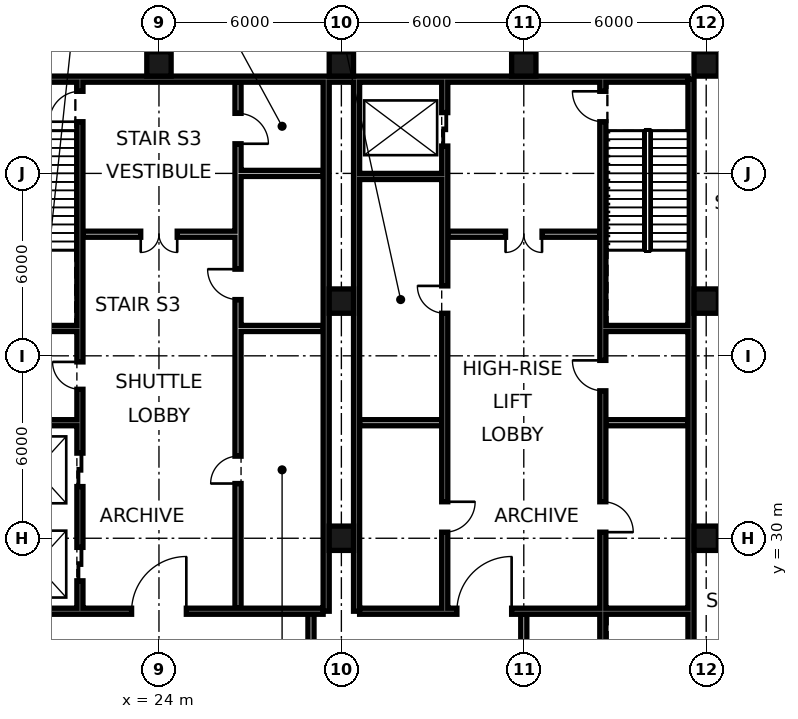
"""IFC4 building model, lengths in metres.
Left out: names, types, materials, properties, quantities, classifications, styles, units other than length and angle.
Written with IfcOpenShell. Run it as: python <this file> out.ifc"""

import sys

from ifc_helpers import new_model, si_unit, direction, frame, frame_2d, origin, origin_2d, place, context, subcontext, project, spatial, rectangle, hollow_rectangle, extrude, element, fill, save


model = new_model("IFC4")
c1 = context("Model", 3, precision=1e-05, world=origin(), true_north=direction((0.0, 1.0)))
c2 = subcontext(c1, "Body", "Model", "MODEL_VIEW")
j1 = project(units=[si_unit("LENGTHUNIT", "METRE"), si_unit("PLANEANGLEUNIT", "RADIAN")], contexts=[c1])
p1 = place(None, origin())
s1 = spatial("IfcSite", under=j1, at=p1, CompositionType="ELEMENT")
p2 = place(p1, origin())
s2 = spatial("IfcBuilding", under=s1, at=p2, CompositionType="ELEMENT")
p3 = place(p2, origin())
s3 = spatial("IfcBuildingStorey", under=s2, at=p3, CompositionType="ELEMENT", Elevation=0.0)
for number, where, z_axis, x_axis in (
    (1, (24.0, 45.6, 0.0), (0.0, 0.0, 1.0), (1.0, 0.0, 0.0)),
    (2, (30.0, 30.0, 0.0), (0.0, 0.0, 1.0), (1.0, 0.0, 0.0)),
    (3, (30.0, 37.8, 0.0), (0.0, 0.0, 1.0), (1.0, 0.0, 0.0)),
    (4, (30.0, 45.6, 0.0), (0.0, 0.0, 1.0), (1.0, 0.0, 0.0)),
    (5, (36.0, 45.6, 0.0), (0.0, 0.0, 1.0), (1.0, 0.0, 0.0)),
    (6, (42.0, 30.0, 0.0), (0.0, 0.0, 1.0), (1.0, 0.0, 0.0)),
    (7, (42.0, 37.8, 0.0), (0.0, 0.0, 1.0), (1.0, 0.0, 0.0)),
    (8, (42.0, 45.6, 0.0), (0.0, 0.0, 1.0), (1.0, 0.0, 0.0)),
):
    element("IfcColumn", number, at=place(p3, frame(where, z_axis=z_axis, x_axis=x_axis)), inside=s3, PredefinedType="COLUMN", context=c2, shape_type="SweptSolid", body=[
        extrude(hollow_rectangle(XDim=0.8, YDim=0.8, WallThickness=0.07, at=origin_2d()), origin(), (0.0, 0.0, 1.0), 15.0),
    ])
p4 = place(p3, frame((41.5, 21.6, 0.0), z_axis=(0.0, 0.0, 1.0), x_axis=(0.0, 1.0, 0.0)))
e9 = element("IfcWall", 9, at=p4, inside=s3, PredefinedType="SOLIDWALL", context=c2, shape_type="SweptSolid", body=[
    extrude(rectangle(XDim=23.5, YDim=0.2, at=frame_2d((11.75, 0.0))), origin(), (0.0, 0.0, 1.0), 14.55),
])
p5 = place(p3, frame((6.6, 45.1, 0.0), z_axis=(0.0, 0.0, 1.0), x_axis=(1.0, 0.0, 0.0)))
e10 = element("IfcWall", 10, at=p5, inside=s3, PredefinedType="SOLIDWALL", context=c2, shape_type="SweptSolid", body=[
    extrude(rectangle(XDim=34.8, YDim=0.2, at=frame_2d((17.4, 0.0))), origin(), (0.0, 0.0, 1.0), 14.55),
])
for number, where, z_axis, x_axis in (
    (11, (29.5, 27.6, 0.0), (0.0, 0.0, 1.0), (0.0, 1.0, 0.0)),
    (12, (30.5, 27.6, 0.0), (0.0, 0.0, 1.0), (0.0, 1.0, 0.0)),
):
    element("IfcWall", number, at=place(p3, frame(where, z_axis=z_axis, x_axis=x_axis)), inside=s3, PredefinedType="SOLIDWALL", context=c2, shape_type="SweptSolid", body=[
        extrude(rectangle(XDim=17.5, YDim=0.2, at=frame_2d((8.75, 0.0))), origin(), (0.0, 0.0, 1.0), 14.55),
    ])
p6 = place(p3, frame((29.0, 21.6, 0.0), z_axis=(0.0, 0.0, 1.0), x_axis=(0.0, 1.0, 0.0)))
e13 = element("IfcWall", 13, at=p6, inside=s3, PredefinedType="PARTITIONING", context=c2, shape_type="SweptSolid", body=[
    extrude(rectangle(XDim=6.0, YDim=0.2, at=frame_2d((3.0, 0.0))), origin(), (0.0, 0.0, 1.0), 13.85),
])
p7 = place(p6, frame((2.1, 0.0, 0.0)))
e14 = element("IfcOpeningElement", 14, at=p7, cuts=e13, PredefinedType="OPENING", context=c2, shape_type="SweptSolid", body=[
    extrude(rectangle(XDim=1.8, YDim=2.1, at=frame_2d((0.9, 1.05))), frame((0.0, 0.11, 0.0), z_axis=(0.0, -1.0, 0.0), x_axis=(1.0, 0.0, 0.0)), (0.0, 0.0, 1.0), 0.22),
])
p8 = place(p3, frame((21.4, 27.7, 0.0), z_axis=(0.0, 0.0, 1.0), x_axis=(0.0, 1.0, 0.0)))
e15 = element("IfcWall", 15, at=p8, inside=s3, PredefinedType="SOLIDWALL", context=c2, shape_type="SweptSolid", body=[
    extrude(rectangle(XDim=17.3, YDim=0.2, at=frame_2d((8.65, 0.0))), origin(), (0.0, 0.0, 1.0), 14.55),
])
p9 = place(p8, frame((0.9, 0.0, 0.0)))
e16 = element("IfcOpeningElement", 16, at=p9, cuts=e15, PredefinedType="OPENING", context=c2, shape_type="SweptSolid", body=[
    extrude(rectangle(XDim=1.1, YDim=2.1, at=frame_2d((0.55, 1.05))), frame((0.0, 0.11, 0.0), z_axis=(0.0, -1.0, 0.0), x_axis=(1.0, 0.0, 0.0)), (0.0, 0.0, 1.0), 0.22),
])
p10 = place(p8, frame((4.0, 0.0, 0.0)))
e17 = element("IfcOpeningElement", 17, at=p10, cuts=e15, PredefinedType="OPENING", context=c2, shape_type="SweptSolid", body=[
    extrude(rectangle(XDim=1.1, YDim=2.1, at=frame_2d((0.55, 1.05))), frame((0.0, 0.11, 0.0), z_axis=(0.0, -1.0, 0.0), x_axis=(1.0, 0.0, 0.0)), (0.0, 0.0, 1.0), 0.22),
])
p11 = place(p8, frame((16.0, 0.0, 0.0)))
e18 = element("IfcOpeningElement", 18, at=p11, cuts=e15, PredefinedType="OPENING", context=c2, shape_type="SweptSolid", body=[
    extrude(rectangle(XDim=1.0, YDim=2.1, at=frame_2d((0.5, 1.05))), frame((0.0, 0.11, 0.0), z_axis=(0.0, -1.0, 0.0), x_axis=(1.0, 0.0, 0.0)), (0.0, 0.0, 1.0), 0.22),
])
p12 = place(p8, frame((7.2, 0.0, 0.0)))
e19 = element("IfcOpeningElement", 19, at=p12, cuts=e15, PredefinedType="OPENING", context=c2, shape_type="SweptSolid", body=[
    extrude(rectangle(XDim=0.9, YDim=2.1, at=frame_2d((0.45, 1.05))), frame((0.0, 0.11, 0.0), z_axis=(0.0, -1.0, 0.0), x_axis=(1.0, 0.0, 0.0)), (0.0, 0.0, 1.0), 0.22),
])
p13 = place(p3, frame((26.6, 27.7, 0.0), z_axis=(0.0, 0.0, 1.0), x_axis=(0.0, 1.0, 0.0)))
e20 = element("IfcWall", 20, at=p13, inside=s3, PredefinedType="SOLIDWALL", context=c2, shape_type="SweptSolid", body=[
    extrude(rectangle(XDim=17.3, YDim=0.2, at=frame_2d((8.65, 0.0))), origin(), (0.0, 0.0, 1.0), 14.55),
])
p14 = place(p13, frame((4.1, 0.0, 0.0)))
e21 = element("IfcOpeningElement", 21, at=p14, cuts=e20, PredefinedType="OPENING", context=c2, shape_type="SweptSolid", body=[
    extrude(rectangle(XDim=0.9, YDim=2.1, at=frame_2d((0.45, 1.05))), frame((0.0, 0.11, 0.0), z_axis=(0.0, -1.0, 0.0), x_axis=(1.0, 0.0, 0.0)), (0.0, 0.0, 1.0), 0.22),
])
p15 = place(p13, frame((10.15, 0.0, 0.0)))
e22 = element("IfcOpeningElement", 22, at=p15, cuts=e20, PredefinedType="OPENING", context=c2, shape_type="SweptSolid", body=[
    extrude(rectangle(XDim=1.0, YDim=2.1, at=frame_2d((0.5, 1.05))), frame((0.0, 0.11, 0.0), z_axis=(0.0, -1.0, 0.0), x_axis=(1.0, 0.0, 0.0)), (0.0, 0.0, 1.0), 0.22),
])
p16 = place(p13, frame((15.275, 0.0, 0.0)))
e23 = element("IfcOpeningElement", 23, at=p16, cuts=e20, PredefinedType="OPENING", context=c2, shape_type="SweptSolid", body=[
    extrude(rectangle(XDim=1.0, YDim=2.1, at=frame_2d((0.5, 1.05))), frame((0.0, 0.11, 0.0), z_axis=(0.0, -1.0, 0.0), x_axis=(1.0, 0.0, 0.0)), (0.0, 0.0, 1.0), 0.22),
])
p17 = place(p3, frame((33.4, 27.7, 0.0), z_axis=(0.0, 0.0, 1.0), x_axis=(0.0, 1.0, 0.0)))
e24 = element("IfcWall", 24, at=p17, inside=s3, PredefinedType="SOLIDWALL", context=c2, shape_type="SweptSolid", body=[
    extrude(rectangle(XDim=17.3, YDim=0.2, at=frame_2d((8.65, 0.0))), origin(), (0.0, 0.0, 1.0), 13.85),
])
p18 = place(p17, frame((15.2, 0.0, 0.0)))
e25 = element("IfcOpeningElement", 25, at=p18, cuts=e24, PredefinedType="OPENING", context=c2, shape_type="SweptSolid", body=[
    extrude(rectangle(XDim=1.1, YDim=2.1, at=frame_2d((0.55, 1.05))), frame((0.0, 0.11, 0.0), z_axis=(0.0, -1.0, 0.0), x_axis=(1.0, 0.0, 0.0)), (0.0, 0.0, 1.0), 0.22),
])
p19 = place(p17, frame((2.5, 0.0, 0.0)))
e26 = element("IfcOpeningElement", 26, at=p19, cuts=e24, PredefinedType="OPENING", context=c2, shape_type="SweptSolid", body=[
    extrude(rectangle(XDim=1.0, YDim=2.1, at=frame_2d((0.5, 1.05))), frame((0.0, 0.11, 0.0), z_axis=(0.0, -1.0, 0.0), x_axis=(1.0, 0.0, 0.0)), (0.0, 0.0, 1.0), 0.22),
])
p20 = place(p17, frame((9.7, 0.0, 0.0)))
e27 = element("IfcOpeningElement", 27, at=p20, cuts=e24, PredefinedType="OPENING", context=c2, shape_type="SweptSolid", body=[
    extrude(rectangle(XDim=0.9, YDim=2.1, at=frame_2d((0.45, 1.05))), frame((0.0, 0.11, 0.0), z_axis=(0.0, -1.0, 0.0), x_axis=(1.0, 0.0, 0.0)), (0.0, 0.0, 1.0), 0.22),
])
p21 = place(p3, frame((36.0, 21.5, 0.0), z_axis=(0.0, 0.0, 1.0), x_axis=(0.0, 1.0, 0.0)))
e28 = element("IfcWall", 28, at=p21, inside=s3, PredefinedType="PARTITIONING", context=c2, shape_type="SweptSolid", body=[
    extrude(rectangle(XDim=6.0, YDim=0.2, at=frame_2d((3.0, 0.0))), origin(), (0.0, 0.0, 1.0), 13.85),
])
p22 = place(p3, frame((38.6, 21.5, 0.0), z_axis=(0.0, 0.0, 1.0), x_axis=(0.0, 1.0, 0.0)))
e29 = element("IfcWall", 29, at=p22, inside=s3, PredefinedType="SOLIDWALL", context=c2, shape_type="SweptSolid", body=[
    extrude(rectangle(XDim=23.5, YDim=0.2, at=frame_2d((11.75, 0.0))), origin(), (0.0, 0.0, 1.0), 13.85),
])
p23 = place(p22, frame((8.7, 0.0, 0.0)))
e30 = element("IfcOpeningElement", 30, at=p23, cuts=e29, PredefinedType="OPENING", context=c2, shape_type="SweptSolid", body=[
    extrude(rectangle(XDim=1.0, YDim=2.1, at=frame_2d((0.5, 1.05))), frame((0.0, 0.11, 0.0), z_axis=(0.0, -1.0, 0.0), x_axis=(1.0, 0.0, 0.0)), (0.0, 0.0, 1.0), 0.22),
])
p24 = place(p22, frame((13.35, 0.0, 0.0)))
e31 = element("IfcOpeningElement", 31, at=p24, cuts=e29, PredefinedType="OPENING", context=c2, shape_type="SweptSolid", body=[
    extrude(rectangle(XDim=1.0, YDim=2.1, at=frame_2d((0.5, 1.05))), frame((0.0, 0.11, 0.0), z_axis=(0.0, -1.0, 0.0), x_axis=(1.0, 0.0, 0.0)), (0.0, 0.0, 1.0), 0.22),
])
p25 = place(p22, frame((22.2, 0.0, 0.0)))
e32 = element("IfcOpeningElement", 32, at=p25, cuts=e29, PredefinedType="OPENING", context=c2, shape_type="SweptSolid", body=[
    extrude(rectangle(XDim=1.0, YDim=2.1, at=frame_2d((0.5, 1.05))), frame((0.0, 0.11, 0.0), z_axis=(0.0, -1.0, 0.0), x_axis=(1.0, 0.0, 0.0)), (0.0, 0.0, 1.0), 0.22),
])
p26 = place(p22, frame((0.275, 0.0, 0.0)))
e33 = element("IfcOpeningElement", 33, at=p26, cuts=e29, PredefinedType="OPENING", context=c2, shape_type="SweptSolid", body=[
    extrude(rectangle(XDim=0.9, YDim=2.1, at=frame_2d((0.45, 1.05))), frame((0.0, 0.11, 0.0), z_axis=(0.0, -1.0, 0.0), x_axis=(1.0, 0.0, 0.0)), (0.0, 0.0, 1.0), 0.22),
])
p27 = place(p3, frame((18.6, 27.6, 0.0), z_axis=(0.0, 0.0, 1.0), x_axis=(1.0, 0.0, 0.0)))
e34 = element("IfcWall", 34, at=p27, inside=s3, PredefinedType="SOLIDWALL", context=c2, shape_type="SweptSolid", body=[
    extrude(rectangle(XDim=10.8, YDim=0.2, at=frame_2d((5.4, 0.0))), origin(), (0.0, 0.0, 1.0), 14.55),
])
p28 = place(p27, frame((4.5, 0.0, 0.0)))
e35 = element("IfcOpeningElement", 35, at=p28, cuts=e34, PredefinedType="OPENING", context=c2, shape_type="SweptSolid", body=[
    extrude(rectangle(XDim=1.8, YDim=2.1, at=frame_2d((0.9, 1.05))), frame((0.0, 0.11, 0.0), z_axis=(0.0, -1.0, 0.0), x_axis=(1.0, 0.0, 0.0)), (0.0, 0.0, 1.0), 0.22),
])
p29 = place(p3, frame((30.6, 27.6, 0.0), z_axis=(0.0, 0.0, 1.0), x_axis=(1.0, 0.0, 0.0)))
e36 = element("IfcWall", 36, at=p29, inside=s3, PredefinedType="SOLIDWALL", context=c2, shape_type="SweptSolid", body=[
    extrude(rectangle(XDim=10.8, YDim=0.2, at=frame_2d((5.4, 0.0))), origin(), (0.0, 0.0, 1.0), 14.55),
])
p30 = place(p29, frame((3.2, 0.0, 0.0)))
e37 = element("IfcOpeningElement", 37, at=p30, cuts=e36, PredefinedType="OPENING", context=c2, shape_type="SweptSolid", body=[
    extrude(rectangle(XDim=1.8, YDim=2.1, at=frame_2d((0.9, 1.05))), frame((0.0, 0.11, 0.0), z_axis=(0.0, -1.0, 0.0), x_axis=(1.0, 0.0, 0.0)), (0.0, 0.0, 1.0), 0.22),
])
for number, where, z_axis, x_axis in (
    (38, (18.6, 33.8, 0.0), (0.0, 0.0, 1.0), (1.0, 0.0, 0.0)),
    (39, (30.6, 33.8, 0.0), (0.0, 0.0, 1.0), (1.0, 0.0, 0.0)),
):
    element("IfcWall", number, at=place(p3, frame(where, z_axis=z_axis, x_axis=x_axis)), inside=s3, PredefinedType="SOLIDWALL", context=c2, shape_type="SweptSolid", body=[
        extrude(rectangle(XDim=2.7, YDim=0.2, at=frame_2d((1.35, 0.0))), origin(), (0.0, 0.0, 1.0), 14.55),
    ])
p31 = place(p3, frame((38.7, 33.8, 0.0), z_axis=(0.0, 0.0, 1.0), x_axis=(1.0, 0.0, 0.0)))
e40 = element("IfcWall", 40, at=p31, inside=s3, PredefinedType="PARTITIONING", context=c2, shape_type="SweptSolid", body=[
    extrude(rectangle(XDim=2.7, YDim=0.2, at=frame_2d((1.35, 0.0))), origin(), (0.0, 0.0, 1.0), 14.55),
])
for number, where, z_axis, x_axis in (
    (41, (18.6, 36.9, 0.0), (0.0, 0.0, 1.0), (1.0, 0.0, 0.0)),
    (42, (26.7, 36.9, 0.0), (0.0, 0.0, 1.0), (1.0, 0.0, 0.0)),
    (43, (38.7, 36.9, 0.0), (0.0, 0.0, 1.0), (1.0, 0.0, 0.0)),
):
    element("IfcWall", number, at=place(p3, frame(where, z_axis=z_axis, x_axis=x_axis)), inside=s3, PredefinedType="SOLIDWALL", context=c2, shape_type="SweptSolid", body=[
        extrude(rectangle(XDim=2.7, YDim=0.2, at=frame_2d((1.35, 0.0))), origin(), (0.0, 0.0, 1.0), 14.55),
    ])
p32 = place(p3, frame((21.5, 40.0, 0.0), z_axis=(0.0, 0.0, 1.0), x_axis=(1.0, 0.0, 0.0)))
e44 = element("IfcWall", 44, at=p32, inside=s3, PredefinedType="PARTITIONING", context=c2, shape_type="SweptSolid", body=[
    extrude(rectangle(XDim=5.0, YDim=0.2, at=frame_2d((2.5, 0.0))), origin(), (0.0, 0.0, 1.0), 14.55),
])
p33 = place(p32, frame((1.9, 0.0, 0.0)))
e45 = element("IfcOpeningElement", 45, at=p33, cuts=e44, PredefinedType="OPENING", context=c2, shape_type="SweptSolid", body=[
    extrude(rectangle(XDim=1.2, YDim=2.1, at=frame_2d((0.6, 1.05))), frame((0.0, 0.11, 0.0), z_axis=(0.0, -1.0, 0.0), x_axis=(1.0, 0.0, 0.0)), (0.0, 0.0, 1.0), 0.22),
])
p34 = place(p3, frame((33.5, 40.0, 0.0), z_axis=(0.0, 0.0, 1.0), x_axis=(1.0, 0.0, 0.0)))
e46 = element("IfcWall", 46, at=p34, inside=s3, PredefinedType="PARTITIONING", context=c2, shape_type="SweptSolid", body=[
    extrude(rectangle(XDim=5.0, YDim=0.2, at=frame_2d((2.5, 0.0))), origin(), (0.0, 0.0, 1.0), 14.55),
])
p35 = place(p34, frame((1.9, 0.0, 0.0)))
e47 = element("IfcOpeningElement", 47, at=p35, cuts=e46, PredefinedType="OPENING", context=c2, shape_type="SweptSolid", body=[
    extrude(rectangle(XDim=1.2, YDim=2.1, at=frame_2d((0.6, 1.05))), frame((0.0, 0.11, 0.0), z_axis=(0.0, -1.0, 0.0), x_axis=(1.0, 0.0, 0.0)), (0.0, 0.0, 1.0), 0.22),
])
p36 = place(p3, frame((30.6, 41.9, 0.0), z_axis=(0.0, 0.0, 1.0), x_axis=(1.0, 0.0, 0.0)))
e48 = element("IfcWall", 48, at=p36, inside=s3, PredefinedType="SOLIDWALL", context=c2, shape_type="SweptSolid", body=[
    extrude(rectangle(XDim=2.7, YDim=0.2, at=frame_2d((1.35, 0.0))), origin(), (0.0, 0.0, 1.0), 14.55),
])
p37 = place(p3, frame((26.7, 42.0, 0.0), z_axis=(0.0, 0.0, 1.0), x_axis=(1.0, 0.0, 0.0)))
e49 = element("IfcWall", 49, at=p37, inside=s3, PredefinedType="PARTITIONING", context=c2, shape_type="SweptSolid", body=[
    extrude(rectangle(XDim=2.7, YDim=0.2, at=frame_2d((1.35, 0.0))), origin(), (0.0, 0.0, 1.0), 14.55),
])
p38 = place(p28, frame((1.8, 0.0, 0.0), z_axis=(0.0, 0.0, 1.0), x_axis=(-1.0, 0.0, 0.0)))
e50 = element("IfcDoor", 50, at=p38, inside=s3, OperationType="SINGLE_SWING_LEFT", PredefinedType="DOOR", context=c2, shape_type="SweptSolid", body=[
    extrude(rectangle(XDim=1.8, YDim=2.1, at=frame_2d((0.9, 1.05))), frame((0.0, 0.025, 0.0), z_axis=(0.0, -1.0, 0.0), x_axis=(1.0, 0.0, 0.0)), (0.0, 0.0, 1.0), 0.05),
])
fill(e35, e50)
p39 = place(p33, frame((1.2, 0.0, 0.0), z_axis=(0.0, 0.0, 1.0), x_axis=(-1.0, 0.0, 0.0)))
e51 = element("IfcDoor", 51, at=p39, inside=s3, OperationType="DOUBLE_DOOR_SINGLE_SWING", PredefinedType="DOOR", context=c2, shape_type="SweptSolid", body=[
    extrude(rectangle(XDim=1.2, YDim=2.1, at=frame_2d((0.6, 1.05))), frame((0.0, 0.025, 0.0), z_axis=(0.0, -1.0, 0.0), x_axis=(1.0, 0.0, 0.0)), (0.0, 0.0, 1.0), 0.05),
])
fill(e45, e51)
p40 = place(p30, frame((1.8, 0.0, 0.0), z_axis=(0.0, 0.0, 1.0), x_axis=(-1.0, 0.0, 0.0)))
e52 = element("IfcDoor", 52, at=p40, inside=s3, OperationType="SINGLE_SWING_LEFT", PredefinedType="DOOR", context=c2, shape_type="SweptSolid", body=[
    extrude(rectangle(XDim=1.8, YDim=2.1, at=frame_2d((0.9, 1.05))), frame((0.0, 0.025, 0.0), z_axis=(0.0, -1.0, 0.0), x_axis=(1.0, 0.0, 0.0)), (0.0, 0.0, 1.0), 0.05),
])
fill(e37, e52)
p41 = place(p35, frame((1.2, 0.0, 0.0), z_axis=(0.0, 0.0, 1.0), x_axis=(-1.0, 0.0, 0.0)))
e53 = element("IfcDoor", 53, at=p41, inside=s3, OperationType="DOUBLE_DOOR_SINGLE_SWING", PredefinedType="DOOR", context=c2, shape_type="SweptSolid", body=[
    extrude(rectangle(XDim=1.2, YDim=2.1, at=frame_2d((0.6, 1.05))), frame((0.0, 0.025, 0.0), z_axis=(0.0, -1.0, 0.0), x_axis=(1.0, 0.0, 0.0)), (0.0, 0.0, 1.0), 0.05),
])
fill(e47, e53)
p42 = place(p9, origin())
e54 = element("IfcDoor", 54, at=p42, inside=s3, OperationType="DOUBLE_DOOR_SLIDING", PredefinedType="DOOR", context=c2, shape_type="SweptSolid", body=[
    extrude(rectangle(XDim=1.1, YDim=2.1, at=frame_2d((0.55, 1.05))), frame((0.0, 0.025, 0.0), z_axis=(0.0, -1.0, 0.0), x_axis=(1.0, 0.0, 0.0)), (0.0, 0.0, 1.0), 0.05),
])
fill(e16, e54)
p43 = place(p10, origin())
e55 = element("IfcDoor", 55, at=p43, inside=s3, OperationType="DOUBLE_DOOR_SLIDING", PredefinedType="DOOR", context=c2, shape_type="SweptSolid", body=[
    extrude(rectangle(XDim=1.1, YDim=2.1, at=frame_2d((0.55, 1.05))), frame((0.0, 0.025, 0.0), z_axis=(0.0, -1.0, 0.0), x_axis=(1.0, 0.0, 0.0)), (0.0, 0.0, 1.0), 0.05),
])
fill(e17, e55)
p44 = place(p18, origin())
e56 = element("IfcDoor", 56, at=p44, inside=s3, OperationType="DOUBLE_DOOR_SLIDING", PredefinedType="DOOR", context=c2, shape_type="SweptSolid", body=[
    extrude(rectangle(XDim=1.1, YDim=2.1, at=frame_2d((0.55, 1.05))), frame((0.0, 0.025, 0.0), z_axis=(0.0, -1.0, 0.0), x_axis=(1.0, 0.0, 0.0)), (0.0, 0.0, 1.0), 0.05),
])
fill(e25, e56)
p45 = place(p23, frame((1.0, 0.0, 0.0), z_axis=(0.0, 0.0, 1.0), x_axis=(-1.0, 0.0, 0.0)))
e57 = element("IfcDoor", 57, at=p45, inside=s3, OperationType="SINGLE_SWING_RIGHT", PredefinedType="DOOR", context=c2, shape_type="SweptSolid", body=[
    extrude(rectangle(XDim=1.0, YDim=2.1, at=frame_2d((0.5, 1.05))), frame((0.0, 0.025, 0.0), z_axis=(0.0, -1.0, 0.0), x_axis=(1.0, 0.0, 0.0)), (0.0, 0.0, 1.0), 0.05),
])
fill(e30, e57)
p46 = place(p24, frame((1.0, 0.0, 0.0), z_axis=(0.0, 0.0, 1.0), x_axis=(-1.0, 0.0, 0.0)))
e58 = element("IfcDoor", 58, at=p46, inside=s3, OperationType="SINGLE_SWING_LEFT", PredefinedType="DOOR", context=c2, shape_type="SweptSolid", body=[
    extrude(rectangle(XDim=1.0, YDim=2.1, at=frame_2d((0.5, 1.05))), frame((0.0, 0.025, 0.0), z_axis=(0.0, -1.0, 0.0), x_axis=(1.0, 0.0, 0.0)), (0.0, 0.0, 1.0), 0.05),
])
fill(e31, e58)
p47 = place(p19, origin())
e59 = element("IfcDoor", 59, at=p47, inside=s3, OperationType="SINGLE_SWING_RIGHT", PredefinedType="DOOR", context=c2, shape_type="SweptSolid", body=[
    extrude(rectangle(XDim=1.0, YDim=2.1, at=frame_2d((0.5, 1.05))), frame((0.0, 0.025, 0.0), z_axis=(0.0, -1.0, 0.0), x_axis=(1.0, 0.0, 0.0)), (0.0, 0.0, 1.0), 0.05),
])
fill(e26, e59)
p48 = place(p25, frame((1.0, 0.0, 0.0), z_axis=(0.0, 0.0, 1.0), x_axis=(-1.0, 0.0, 0.0)))
e60 = element("IfcDoor", 60, at=p48, inside=s3, OperationType="SINGLE_SWING_LEFT", PredefinedType="DOOR", context=c2, shape_type="SweptSolid", body=[
    extrude(rectangle(XDim=1.0, YDim=2.1, at=frame_2d((0.5, 1.05))), frame((0.0, 0.025, 0.0), z_axis=(0.0, -1.0, 0.0), x_axis=(1.0, 0.0, 0.0)), (0.0, 0.0, 1.0), 0.05),
])
fill(e32, e60)
p49 = place(p11, origin())
e61 = element("IfcDoor", 61, at=p49, inside=s3, OperationType="SINGLE_SWING_LEFT", PredefinedType="DOOR", context=c2, shape_type="SweptSolid", body=[
    extrude(rectangle(XDim=1.0, YDim=2.1, at=frame_2d((0.5, 1.05))), frame((0.0, 0.025, 0.0), z_axis=(0.0, -1.0, 0.0), x_axis=(1.0, 0.0, 0.0)), (0.0, 0.0, 1.0), 0.05),
])
fill(e18, e61)
p50 = place(p20, frame((0.9, 0.0, 0.0), z_axis=(0.0, 0.0, 1.0), x_axis=(-1.0, 0.0, 0.0)))
e62 = element("IfcDoor", 62, at=p50, inside=s3, OperationType="SINGLE_SWING_LEFT", PredefinedType="DOOR", context=c2, shape_type="SweptSolid", body=[
    extrude(rectangle(XDim=0.9, YDim=2.1, at=frame_2d((0.45, 1.05))), frame((0.0, 0.025, 0.0), z_axis=(0.0, -1.0, 0.0), x_axis=(1.0, 0.0, 0.0)), (0.0, 0.0, 1.0), 0.05),
])
fill(e27, e62)
p51 = place(p12, frame((0.9, 0.0, 0.0), z_axis=(0.0, 0.0, 1.0), x_axis=(-1.0, 0.0, 0.0)))
e63 = element("IfcDoor", 63, at=p51, inside=s3, OperationType="SINGLE_SWING_LEFT", PredefinedType="DOOR", context=c2, shape_type="SweptSolid", body=[
    extrude(rectangle(XDim=0.9, YDim=2.1, at=frame_2d((0.45, 1.05))), frame((0.0, 0.025, 0.0), z_axis=(0.0, -1.0, 0.0), x_axis=(1.0, 0.0, 0.0)), (0.0, 0.0, 1.0), 0.05),
])
fill(e19, e63)
p52 = place(p14, origin())
e64 = element("IfcDoor", 64, at=p52, inside=s3, OperationType="SINGLE_SWING_LEFT", PredefinedType="DOOR", context=c2, shape_type="SweptSolid", body=[
    extrude(rectangle(XDim=0.9, YDim=2.1, at=frame_2d((0.45, 1.05))), frame((0.0, 0.025, 0.0), z_axis=(0.0, -1.0, 0.0), x_axis=(1.0, 0.0, 0.0)), (0.0, 0.0, 1.0), 0.05),
])
fill(e21, e64)
p53 = place(p15, frame((1.0, 0.0, 0.0), z_axis=(0.0, 0.0, 1.0), x_axis=(-1.0, 0.0, 0.0)))
e65 = element("IfcDoor", 65, at=p53, inside=s3, OperationType="SINGLE_SWING_LEFT", PredefinedType="DOOR", context=c2, shape_type="SweptSolid", body=[
    extrude(rectangle(XDim=1.0, YDim=2.1, at=frame_2d((0.5, 1.05))), frame((0.0, 0.025, 0.0), z_axis=(0.0, -1.0, 0.0), x_axis=(1.0, 0.0, 0.0)), (0.0, 0.0, 1.0), 0.05),
])
fill(e22, e65)
p54 = place(p16, frame((1.0, 0.0, 0.0), z_axis=(0.0, 0.0, 1.0), x_axis=(-1.0, 0.0, 0.0)))
e66 = element("IfcDoor", 66, at=p54, inside=s3, OperationType="SINGLE_SWING_RIGHT", PredefinedType="DOOR", context=c2, shape_type="SweptSolid", body=[
    extrude(rectangle(XDim=1.0, YDim=2.1, at=frame_2d((0.5, 1.05))), frame((0.0, 0.025, 0.0), z_axis=(0.0, -1.0, 0.0), x_axis=(1.0, 0.0, 0.0)), (0.0, 0.0, 1.0), 0.05),
])
fill(e23, e66)
save(model, sys.argv[1])
